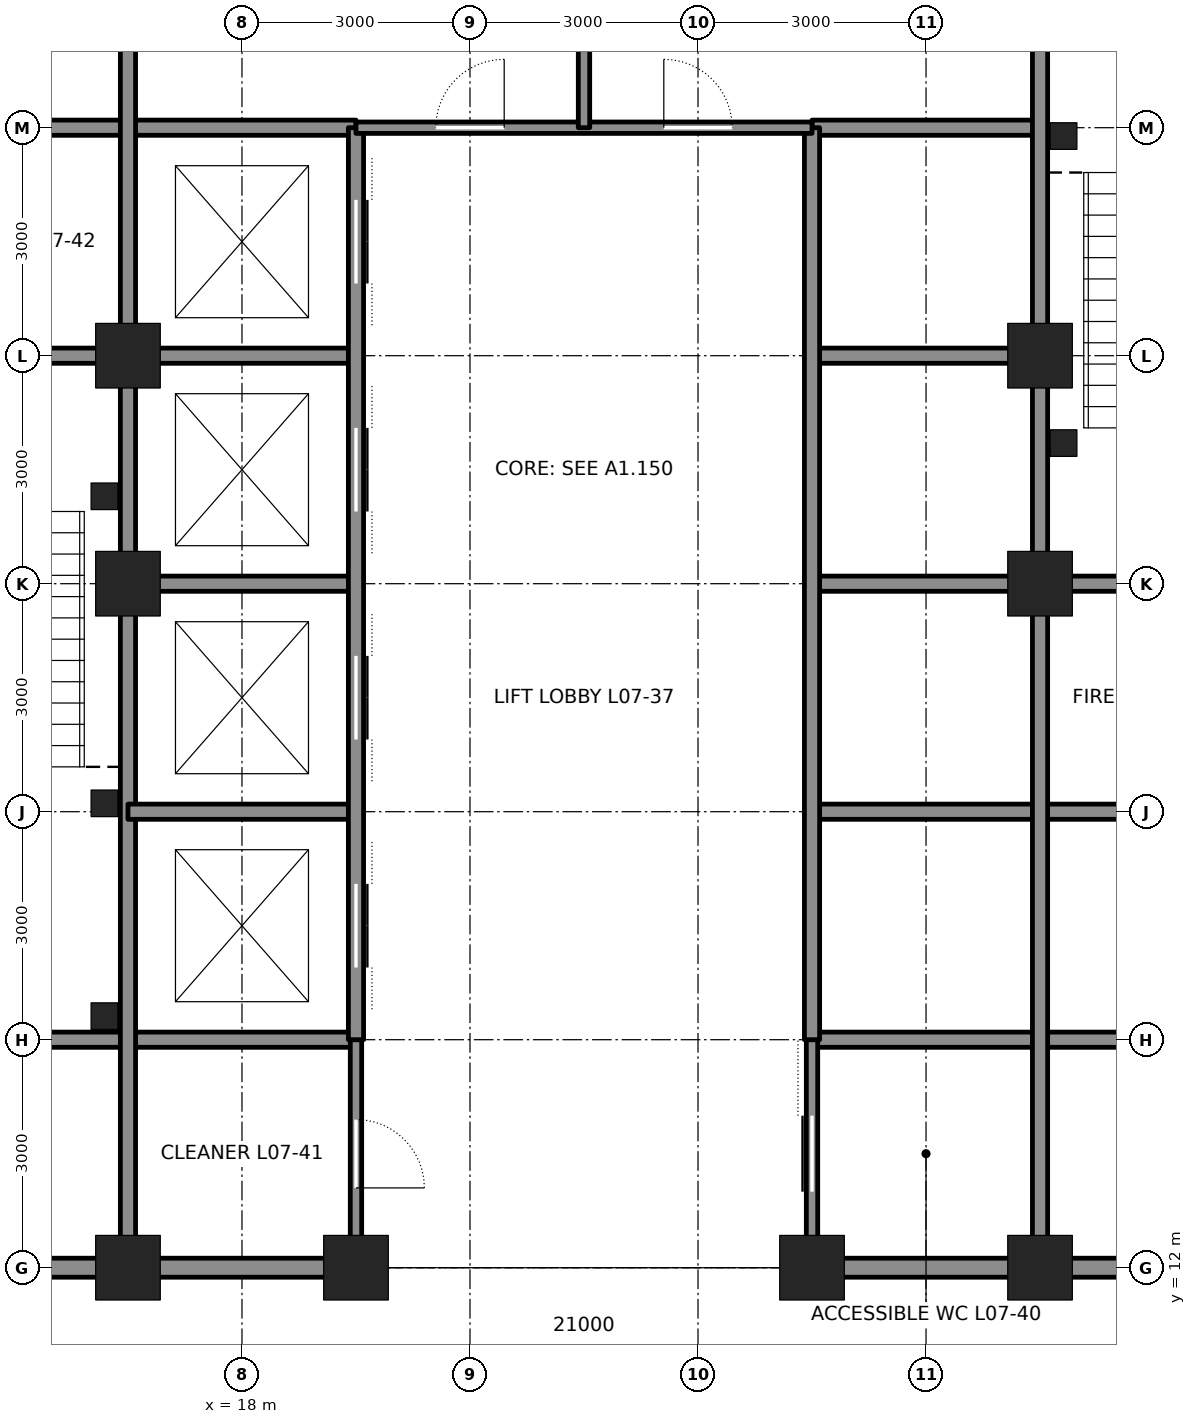
"""IFC4 building model, lengths in metres.
Left out: names, types, materials, properties, quantities, classifications, styles, units other than length and angle.
Written with IfcOpenShell. Run it as: python <this file> out.ifc"""

import sys

from ifc_helpers import new_model, si_unit, direction, frame, frame_2d, origin, origin_2d, place, context, subcontext, project, spatial, rectangle, hollow_rectangle, extrude, element, fill, save


model = new_model("IFC4")
c1 = context("Model", 3, precision=1e-05, world=origin(), true_north=direction((0.0, 1.0)))
c2 = subcontext(c1, "Body", "Model", "MODEL_VIEW")
j1 = project(units=[si_unit("LENGTHUNIT", "METRE"), si_unit("PLANEANGLEUNIT", "RADIAN")], contexts=[c1])
p1 = place(None, origin())
s1 = spatial("IfcSite", under=j1, at=p1, CompositionType="ELEMENT")
p2 = place(p1, origin())
s2 = spatial("IfcBuilding", under=s1, at=p2, CompositionType="ELEMENT")
p3 = place(p2, frame((0.0, 0.0, 37.8)))
s3 = spatial("IfcBuildingStorey", under=s2, at=p3, CompositionType="ELEMENT", Elevation=37.8)
for number, where, z_axis, x_axis in (
    (1, (16.5, 12.0, 0.0), (0.0, 0.0, 1.0), (1.0, 0.0, 0.0)),
    (2, (19.5, 12.0, 0.0), (0.0, 0.0, 1.0), (1.0, 0.0, 0.0)),
    (3, (25.5, 12.0, 0.0), (0.0, 0.0, 1.0), (1.0, 0.0, 0.0)),
    (4, (28.5, 12.0, 0.0), (0.0, 0.0, 1.0), (1.0, 0.0, 0.0)),
    (5, (16.5, 21.0, 0.0), (0.0, 0.0, 1.0), (1.0, 0.0, 0.0)),
    (6, (16.5, 24.0, 0.0), (0.0, 0.0, 1.0), (1.0, 0.0, 0.0)),
    (7, (28.5, 21.0, 0.0), (0.0, 0.0, 1.0), (1.0, 0.0, 0.0)),
    (8, (28.5, 24.0, 0.0), (0.0, 0.0, 1.0), (1.0, 0.0, 0.0)),
):
    element("IfcColumn", number, at=place(p3, frame(where, z_axis=z_axis, x_axis=x_axis)), inside=s3, PredefinedType="COLUMN", context=c2, shape_type="SweptSolid", body=[
        extrude(hollow_rectangle(XDim=0.85, YDim=0.85, WallThickness=0.085, at=origin_2d()), origin(), (0.0, 0.0, 1.0), 4.5),
    ])
p4 = place(p3, frame((12.25, 12.0, 0.0), z_axis=(0.0, 0.0, 1.0), x_axis=(1.0, 0.0, 0.0)))
e9 = element("IfcWall", 9, at=p4, inside=s3, PredefinedType="SOLIDWALL", context=c2, shape_type="SweptSolid", body=[
    extrude(rectangle(XDim=4.0, YDim=0.25, at=frame_2d((2.0, 0.0))), origin(), (0.0, 0.0, 1.0), 3.181),
])
for number, where, z_axis, x_axis in (
    (10, (16.75, 12.0, 0.0), (0.0, 0.0, 1.0), (1.0, 0.0, 0.0)),
    (11, (25.75, 12.0, 0.0), (0.0, 0.0, 1.0), (1.0, 0.0, 0.0)),
):
    element("IfcWall", number, at=place(p3, frame(where, z_axis=z_axis, x_axis=x_axis)), inside=s3, PredefinedType="SOLIDWALL", context=c2, shape_type="SweptSolid", body=[
        extrude(rectangle(XDim=2.5, YDim=0.25, at=frame_2d((1.25, 0.0))), origin(), (0.0, 0.0, 1.0), 3.181),
    ])
p5 = place(p3, frame((28.75, 12.0, 0.0), z_axis=(0.0, 0.0, 1.0), x_axis=(1.0, 0.0, 0.0)))
e12 = element("IfcWall", 12, at=p5, inside=s3, PredefinedType="SOLIDWALL", context=c2, shape_type="SweptSolid", body=[
    extrude(rectangle(XDim=4.0, YDim=0.25, at=frame_2d((2.0, 0.0))), origin(), (0.0, 0.0, 1.0), 3.181),
])
for number, where, z_axis, x_axis in (
    (13, (12.0, 15.0, 0.0), (0.0, 0.0, 1.0), (1.0, 0.0, 0.0)),
    (14, (25.5, 15.0, 0.0), (0.0, 0.0, 1.0), (1.0, 0.0, 0.0)),
):
    element("IfcWall", number, at=place(p3, frame(where, z_axis=z_axis, x_axis=x_axis)), inside=s3, PredefinedType="SOLIDWALL", context=c2, shape_type="SweptSolid", body=[
        extrude(rectangle(XDim=7.5, YDim=0.2, at=frame_2d((3.75, 0.0))), origin(), (0.0, 0.0, 1.0), 4.34),
    ])
p6 = place(p3, frame((12.25, 24.0, 0.0), z_axis=(0.0, 0.0, 1.0), x_axis=(1.0, 0.0, 0.0)))
e15 = element("IfcWall", 15, at=p6, inside=s3, PredefinedType="SOLIDWALL", context=c2, shape_type="SweptSolid", body=[
    extrude(rectangle(XDim=4.0, YDim=0.2, at=frame_2d((2.0, 0.0))), origin(), (0.0, 0.0, 1.0), 3.39),
])
p7 = place(p6, frame((1.4, 0.0, 0.0)))
e16 = element("IfcOpeningElement", 16, at=p7, cuts=e15, PredefinedType="OPENING", context=c2, shape_type="SweptSolid", body=[
    extrude(rectangle(XDim=1.2, YDim=2.1, at=frame_2d((0.6, 1.05))), frame((0.0, 0.11, 0.0), z_axis=(0.0, -1.0, 0.0), x_axis=(1.0, 0.0, 0.0)), (0.0, 0.0, 1.0), 0.22),
])
for number, where, z_axis, x_axis in (
    (17, (16.75, 24.0, 0.0), (0.0, 0.0, 1.0), (1.0, 0.0, 0.0)),
    (18, (25.5, 24.0, 0.0), (0.0, 0.0, 1.0), (1.0, 0.0, 0.0)),
):
    element("IfcWall", number, at=place(p3, frame(where, z_axis=z_axis, x_axis=x_axis)), inside=s3, PredefinedType="SOLIDWALL", context=c2, shape_type="SweptSolid", body=[
        extrude(rectangle(XDim=2.75, YDim=0.2, at=frame_2d((1.375, 0.0))), origin(), (0.0, 0.0, 1.0), 3.39),
    ])
p8 = place(p3, frame((12.0, 27.0, 0.0), z_axis=(0.0, 0.0, 1.0), x_axis=(1.0, 0.0, 0.0)))
e19 = element("IfcWall", 19, at=p8, inside=s3, PredefinedType="SOLIDWALL", context=c2, shape_type="SweptSolid", body=[
    extrude(rectangle(XDim=7.5, YDim=0.2, at=frame_2d((3.75, 0.0))), origin(), (0.0, 0.0, 1.0), 4.34),
])
p9 = place(p8, frame((1.65, 0.0, 0.0)))
e20 = element("IfcOpeningElement", 20, at=p9, cuts=e19, PredefinedType="OPENING", context=c2, shape_type="SweptSolid", body=[
    extrude(rectangle(XDim=1.2, YDim=2.1, at=frame_2d((0.6, 1.05))), frame((0.0, 0.11, 0.0), z_axis=(0.0, -1.0, 0.0), x_axis=(1.0, 0.0, 0.0)), (0.0, 0.0, 1.0), 0.22),
])
p10 = place(p3, frame((25.5, 27.0, 0.0), z_axis=(0.0, 0.0, 1.0), x_axis=(1.0, 0.0, 0.0)))
e21 = element("IfcWall", 21, at=p10, inside=s3, PredefinedType="SOLIDWALL", context=c2, shape_type="SweptSolid", body=[
    extrude(rectangle(XDim=3.0, YDim=0.2, at=frame_2d((1.5, 0.0))), origin(), (0.0, 0.0, 1.0), 4.34),
])
p11 = place(p3, frame((16.5, 12.25, 0.0), z_axis=(0.0, 0.0, 1.0), x_axis=(0.0, 1.0, 0.0)))
e22 = element("IfcWall", 22, at=p11, inside=s3, PredefinedType="SOLIDWALL", context=c2, shape_type="SweptSolid", body=[
    extrude(rectangle(XDim=8.5, YDim=0.2, at=frame_2d((4.25, 0.0))), origin(), (0.0, 0.0, 1.0), 3.413),
])
p12 = place(p3, frame((16.5, 21.25, 0.0), z_axis=(0.0, 0.0, 1.0), x_axis=(0.0, 1.0, 0.0)))
e23 = element("IfcWall", 23, at=p12, inside=s3, PredefinedType="SOLIDWALL", context=c2, shape_type="SweptSolid", body=[
    extrude(rectangle(XDim=2.5, YDim=0.2, at=frame_2d((1.25, 0.0))), origin(), (0.0, 0.0, 1.0), 3.413),
])
p13 = place(p3, frame((16.5, 24.25, 0.0), z_axis=(0.0, 0.0, 1.0), x_axis=(0.0, 1.0, 0.0)))
e24 = element("IfcWall", 24, at=p13, inside=s3, PredefinedType="SOLIDWALL", context=c2, shape_type="SweptSolid", body=[
    extrude(rectangle(XDim=8.5, YDim=0.2, at=frame_2d((4.25, 0.0))), origin(), (0.0, 0.0, 1.0), 3.413),
])
p14 = place(p3, frame((16.5, 18.0, 0.0), z_axis=(0.0, 0.0, 1.0), x_axis=(1.0, 0.0, 0.0)))
e25 = element("IfcWall", 25, at=p14, inside=s3, PredefinedType="SOLIDWALL", context=c2, shape_type="SweptSolid", body=[
    extrude(rectangle(XDim=3.0, YDim=0.2, at=frame_2d((1.5, 0.0))), origin(), (0.0, 0.0, 1.0), 4.34),
])
p15 = place(p3, frame((25.5, 18.0, 0.0), z_axis=(0.0, 0.0, 1.0), x_axis=(1.0, 0.0, 0.0)))
e26 = element("IfcWall", 26, at=p15, inside=s3, PredefinedType="SOLIDWALL", context=c2, shape_type="SweptSolid", body=[
    extrude(rectangle(XDim=7.5, YDim=0.2, at=frame_2d((3.75, 0.0))), origin(), (0.0, 0.0, 1.0), 4.34),
])
p16 = place(p15, frame((4.65, 0.0, 0.0)))
e27 = element("IfcOpeningElement", 27, at=p16, cuts=e26, PredefinedType="OPENING", context=c2, shape_type="SweptSolid", body=[
    extrude(rectangle(XDim=1.2, YDim=2.1, at=frame_2d((0.6, 1.05))), frame((0.0, 0.11, 0.0), z_axis=(0.0, -1.0, 0.0), x_axis=(1.0, 0.0, 0.0)), (0.0, 0.0, 1.0), 0.22),
])
for number, where, z_axis, x_axis in (
    (28, (16.75, 21.0, 0.0), (0.0, 0.0, 1.0), (1.0, 0.0, 0.0)),
    (29, (25.5, 21.0, 0.0), (0.0, 0.0, 1.0), (1.0, 0.0, 0.0)),
):
    element("IfcWall", number, at=place(p3, frame(where, z_axis=z_axis, x_axis=x_axis)), inside=s3, PredefinedType="SOLIDWALL", context=c2, shape_type="SweptSolid", body=[
        extrude(rectangle(XDim=2.75, YDim=0.2, at=frame_2d((1.375, 0.0))), origin(), (0.0, 0.0, 1.0), 3.39),
    ])
p17 = place(p3, frame((28.75, 21.0, 0.0), z_axis=(0.0, 0.0, 1.0), x_axis=(1.0, 0.0, 0.0)))
e30 = element("IfcWall", 30, at=p17, inside=s3, PredefinedType="SOLIDWALL", context=c2, shape_type="SweptSolid", body=[
    extrude(rectangle(XDim=4.0, YDim=0.2, at=frame_2d((2.0, 0.0))), origin(), (0.0, 0.0, 1.0), 3.39),
])
p18 = place(p17, frame((1.4, 0.0, 0.0)))
e31 = element("IfcOpeningElement", 31, at=p18, cuts=e30, PredefinedType="OPENING", context=c2, shape_type="SweptSolid", body=[
    extrude(rectangle(XDim=1.2, YDim=2.1, at=frame_2d((0.6, 1.05))), frame((0.0, 0.11, 0.0), z_axis=(0.0, -1.0, 0.0), x_axis=(1.0, 0.0, 0.0)), (0.0, 0.0, 1.0), 0.22),
])
p19 = place(p3, frame((19.5, 12.25, 0.0), z_axis=(0.0, 0.0, 1.0), x_axis=(0.0, 1.0, 0.0)))
e32 = element("IfcWall", 32, at=p19, inside=s3, PredefinedType="PARTITIONING", context=c2, shape_type="SweptSolid", body=[
    extrude(rectangle(XDim=2.75, YDim=0.15, at=frame_2d((1.375, 0.0))), origin(), (0.0, 0.0, 1.0), 3.365),
])
p20 = place(p19, frame((0.8, 0.0, 0.0)))
e33 = element("IfcOpeningElement", 33, at=p20, cuts=e32, PredefinedType="OPENING", context=c2, shape_type="SweptSolid", body=[
    extrude(rectangle(XDim=0.9, YDim=2.1, at=frame_2d((0.45, 1.05))), frame((0.0, 0.085, 0.0), z_axis=(0.0, -1.0, 0.0), x_axis=(1.0, 0.0, 0.0)), (0.0, 0.0, 1.0), 0.17),
])
p21 = place(p3, frame((19.5, 15.0, 0.0), z_axis=(0.0, 0.0, 1.0), x_axis=(0.0, 1.0, 0.0)))
e34 = element("IfcWall", 34, at=p21, inside=s3, PredefinedType="SOLIDWALL", context=c2, shape_type="SweptSolid", body=[
    extrude(rectangle(XDim=12.0, YDim=0.2, at=frame_2d((6.0, 0.0))), origin(), (0.0, 0.0, 1.0), 3.365),
])
p22 = place(p21, frame((0.95, 0.0, 0.0)))
e35 = element("IfcOpeningElement", 35, at=p22, cuts=e34, PredefinedType="OPENING", context=c2, shape_type="SweptSolid", body=[
    extrude(rectangle(XDim=1.1, YDim=2.1, at=frame_2d((0.55, 1.05))), frame((0.0, 0.11, 0.0), z_axis=(0.0, -1.0, 0.0), x_axis=(1.0, 0.0, 0.0)), (0.0, 0.0, 1.0), 0.22),
])
p23 = place(p21, frame((3.95, 0.0, 0.0)))
e36 = element("IfcOpeningElement", 36, at=p23, cuts=e34, PredefinedType="OPENING", context=c2, shape_type="SweptSolid", body=[
    extrude(rectangle(XDim=1.1, YDim=2.1, at=frame_2d((0.55, 1.05))), frame((0.0, 0.11, 0.0), z_axis=(0.0, -1.0, 0.0), x_axis=(1.0, 0.0, 0.0)), (0.0, 0.0, 1.0), 0.22),
])
p24 = place(p21, frame((6.95, 0.0, 0.0)))
e37 = element("IfcOpeningElement", 37, at=p24, cuts=e34, PredefinedType="OPENING", context=c2, shape_type="SweptSolid", body=[
    extrude(rectangle(XDim=1.1, YDim=2.1, at=frame_2d((0.55, 1.05))), frame((0.0, 0.11, 0.0), z_axis=(0.0, -1.0, 0.0), x_axis=(1.0, 0.0, 0.0)), (0.0, 0.0, 1.0), 0.22),
])
p25 = place(p21, frame((9.95, 0.0, 0.0)))
e38 = element("IfcOpeningElement", 38, at=p25, cuts=e34, PredefinedType="OPENING", context=c2, shape_type="SweptSolid", body=[
    extrude(rectangle(XDim=1.1, YDim=2.1, at=frame_2d((0.55, 1.05))), frame((0.0, 0.11, 0.0), z_axis=(0.0, -1.0, 0.0), x_axis=(1.0, 0.0, 0.0)), (0.0, 0.0, 1.0), 0.22),
])
p26 = place(p3, frame((25.5, 12.25, 0.0), z_axis=(0.0, 0.0, 1.0), x_axis=(0.0, 1.0, 0.0)))
e39 = element("IfcWall", 39, at=p26, inside=s3, PredefinedType="PARTITIONING", context=c2, shape_type="SweptSolid", body=[
    extrude(rectangle(XDim=2.75, YDim=0.15, at=frame_2d((1.375, 0.0))), origin(), (0.0, 0.0, 1.0), 3.365),
])
p27 = place(p26, frame((0.75, 0.0, 0.0)))
e40 = element("IfcOpeningElement", 40, at=p27, cuts=e39, PredefinedType="OPENING", context=c2, shape_type="SweptSolid", body=[
    extrude(rectangle(XDim=1.0, YDim=2.1, at=frame_2d((0.5, 1.05))), frame((0.0, 0.085, 0.0), z_axis=(0.0, -1.0, 0.0), x_axis=(1.0, 0.0, 0.0)), (0.0, 0.0, 1.0), 0.17),
])
p28 = place(p3, frame((25.5, 15.0, 0.0), z_axis=(0.0, 0.0, 1.0), x_axis=(0.0, 1.0, 0.0)))
e41 = element("IfcWall", 41, at=p28, inside=s3, PredefinedType="SOLIDWALL", context=c2, shape_type="SweptSolid", body=[
    extrude(rectangle(XDim=12.0, YDim=0.2, at=frame_2d((6.0, 0.0))), origin(), (0.0, 0.0, 1.0), 3.365),
])
p29 = place(p3, frame((28.5, 12.25, 0.0), z_axis=(0.0, 0.0, 1.0), x_axis=(0.0, 1.0, 0.0)))
e42 = element("IfcWall", 42, at=p29, inside=s3, PredefinedType="SOLIDWALL", context=c2, shape_type="SweptSolid", body=[
    extrude(rectangle(XDim=8.5, YDim=0.2, at=frame_2d((4.25, 0.0))), origin(), (0.0, 0.0, 1.0), 3.413),
])
p30 = place(p3, frame((28.5, 21.25, 0.0), z_axis=(0.0, 0.0, 1.0), x_axis=(0.0, 1.0, 0.0)))
e43 = element("IfcWall", 43, at=p30, inside=s3, PredefinedType="SOLIDWALL", context=c2, shape_type="SweptSolid", body=[
    extrude(rectangle(XDim=2.5, YDim=0.2, at=frame_2d((1.25, 0.0))), origin(), (0.0, 0.0, 1.0), 3.413),
])
p31 = place(p3, frame((28.5, 24.25, 0.0), z_axis=(0.0, 0.0, 1.0), x_axis=(0.0, 1.0, 0.0)))
e44 = element("IfcWall", 44, at=p31, inside=s3, PredefinedType="SOLIDWALL", context=c2, shape_type="SweptSolid", body=[
    extrude(rectangle(XDim=8.5, YDim=0.2, at=frame_2d((4.25, 0.0))), origin(), (0.0, 0.0, 1.0), 3.413),
])
p32 = place(p3, frame((19.5, 27.0, 0.0), z_axis=(0.0, 0.0, 1.0), x_axis=(1.0, 0.0, 0.0)))
e45 = element("IfcWall", 45, at=p32, inside=s3, PredefinedType="PARTITIONING", context=c2, shape_type="SweptSolid", body=[
    extrude(rectangle(XDim=6.0, YDim=0.15, at=frame_2d((3.0, 0.0))), origin(), (0.0, 0.0, 1.0), 4.34),
])
p33 = place(p32, frame((1.05, 0.0, 0.0)))
e46 = element("IfcOpeningElement", 46, at=p33, cuts=e45, PredefinedType="OPENING", context=c2, shape_type="SweptSolid", body=[
    extrude(rectangle(XDim=0.9, YDim=2.1, at=frame_2d((0.45, 1.05))), frame((0.0, 0.085, 0.0), z_axis=(0.0, -1.0, 0.0), x_axis=(1.0, 0.0, 0.0)), (0.0, 0.0, 1.0), 0.17),
])
p34 = place(p32, frame((4.05, 0.0, 0.0)))
e47 = element("IfcOpeningElement", 47, at=p34, cuts=e45, PredefinedType="OPENING", context=c2, shape_type="SweptSolid", body=[
    extrude(rectangle(XDim=0.9, YDim=2.1, at=frame_2d((0.45, 1.05))), frame((0.0, 0.085, 0.0), z_axis=(0.0, -1.0, 0.0), x_axis=(1.0, 0.0, 0.0)), (0.0, 0.0, 1.0), 0.17),
])
p35 = place(p3, frame((22.5, 27.0, 0.0), z_axis=(0.0, 0.0, 1.0), x_axis=(0.0, 1.0, 0.0)))
e48 = element("IfcWall", 48, at=p35, inside=s3, PredefinedType="PARTITIONING", context=c2, shape_type="SweptSolid", body=[
    extrude(rectangle(XDim=6.0, YDim=0.15, at=frame_2d((3.0, 0.0))), origin(), (0.0, 0.0, 1.0), 4.34),
])
for number, where, z_axis, x_axis in (
    (49, (16.19, 15.31, 0.0), (0.0, 0.0, 1.0), (1.0, 0.0, 0.0)),
    (50, (16.19, 18.11, 0.0), (0.0, 0.0, 1.0), (1.0, 0.0, 0.0)),
    (51, (16.19, 22.15, 0.0), (0.0, 0.0, 1.0), (1.0, 0.0, 0.0)),
    (52, (28.81, 26.89, 0.0), (0.0, 0.0, 1.0), (1.0, 0.0, 0.0)),
    (53, (28.81, 22.85, 0.0), (0.0, 0.0, 1.0), (1.0, 0.0, 0.0)),
):
    element("IfcColumn", number, at=place(p3, frame(where, z_axis=z_axis, x_axis=x_axis)), inside=s3, PredefinedType="COLUMN", context=c2, shape_type="SweptSolid", body=[
        extrude(hollow_rectangle(XDim=0.35, YDim=0.35, WallThickness=0.035, at=origin_2d()), origin(), (0.0, 0.0, 1.0), 4.5),
    ])
p36 = place(p33, origin())
e54 = element("IfcDoor", 54, at=p36, inside=s3, OperationType="SINGLE_SWING_RIGHT", PredefinedType="DOOR", context=c2, shape_type="SweptSolid", body=[
    extrude(rectangle(XDim=0.9, YDim=2.1, at=frame_2d((0.45, 1.05))), frame((0.0, 0.025, 0.0), z_axis=(0.0, -1.0, 0.0), x_axis=(1.0, 0.0, 0.0)), (0.0, 0.0, 1.0), 0.05),
])
fill(e46, e54)
p37 = place(p34, origin())
e55 = element("IfcDoor", 55, at=p37, inside=s3, OperationType="SINGLE_SWING_LEFT", PredefinedType="DOOR", context=c2, shape_type="SweptSolid", body=[
    extrude(rectangle(XDim=0.9, YDim=2.1, at=frame_2d((0.45, 1.05))), frame((0.0, 0.025, 0.0), z_axis=(0.0, -1.0, 0.0), x_axis=(1.0, 0.0, 0.0)), (0.0, 0.0, 1.0), 0.05),
])
fill(e47, e55)
p38 = place(p27, origin())
e56 = element("IfcDoor", 56, at=p38, inside=s3, OperationType="SLIDING_TO_LEFT", PredefinedType="DOOR", context=c2, shape_type="SweptSolid", body=[
    extrude(rectangle(XDim=1.0, YDim=2.1, at=frame_2d((0.5, 1.05))), frame((0.0, 0.025, 0.0), z_axis=(0.0, -1.0, 0.0), x_axis=(1.0, 0.0, 0.0)), (0.0, 0.0, 1.0), 0.05),
])
fill(e40, e56)
p39 = place(p20, frame((0.9, 0.0, 0.0), z_axis=(0.0, 0.0, 1.0), x_axis=(-1.0, 0.0, 0.0)))
e57 = element("IfcDoor", 57, at=p39, inside=s3, OperationType="SINGLE_SWING_RIGHT", PredefinedType="DOOR", context=c2, shape_type="SweptSolid", body=[
    extrude(rectangle(XDim=0.9, YDim=2.1, at=frame_2d((0.45, 1.05))), frame((0.0, 0.025, 0.0), z_axis=(0.0, -1.0, 0.0), x_axis=(1.0, 0.0, 0.0)), (0.0, 0.0, 1.0), 0.05),
])
fill(e33, e57)
p40 = place(p22, origin())
e58 = element("IfcDoor", 58, at=p40, inside=s3, OperationType="DOUBLE_DOOR_SLIDING", PredefinedType="DOOR", context=c2, shape_type="SweptSolid", body=[
    extrude(rectangle(XDim=1.1, YDim=2.1, at=frame_2d((0.55, 1.05))), frame((0.0, 0.025, 0.0), z_axis=(0.0, -1.0, 0.0), x_axis=(1.0, 0.0, 0.0)), (0.0, 0.0, 1.0), 0.05),
])
fill(e35, e58)
p41 = place(p23, origin())
e59 = element("IfcDoor", 59, at=p41, inside=s3, OperationType="DOUBLE_DOOR_SLIDING", PredefinedType="DOOR", context=c2, shape_type="SweptSolid", body=[
    extrude(rectangle(XDim=1.1, YDim=2.1, at=frame_2d((0.55, 1.05))), frame((0.0, 0.025, 0.0), z_axis=(0.0, -1.0, 0.0), x_axis=(1.0, 0.0, 0.0)), (0.0, 0.0, 1.0), 0.05),
])
fill(e36, e59)
p42 = place(p24, origin())
e60 = element("IfcDoor", 60, at=p42, inside=s3, OperationType="DOUBLE_DOOR_SLIDING", PredefinedType="DOOR", context=c2, shape_type="SweptSolid", body=[
    extrude(rectangle(XDim=1.1, YDim=2.1, at=frame_2d((0.55, 1.05))), frame((0.0, 0.025, 0.0), z_axis=(0.0, -1.0, 0.0), x_axis=(1.0, 0.0, 0.0)), (0.0, 0.0, 1.0), 0.05),
])
fill(e37, e60)
p43 = place(p25, origin())
e61 = element("IfcDoor", 61, at=p43, inside=s3, OperationType="DOUBLE_DOOR_SLIDING", PredefinedType="DOOR", context=c2, shape_type="SweptSolid", body=[
    extrude(rectangle(XDim=1.1, YDim=2.1, at=frame_2d((0.55, 1.05))), frame((0.0, 0.025, 0.0), z_axis=(0.0, -1.0, 0.0), x_axis=(1.0, 0.0, 0.0)), (0.0, 0.0, 1.0), 0.05),
])
fill(e38, e61)
save(model, sys.argv[1])
